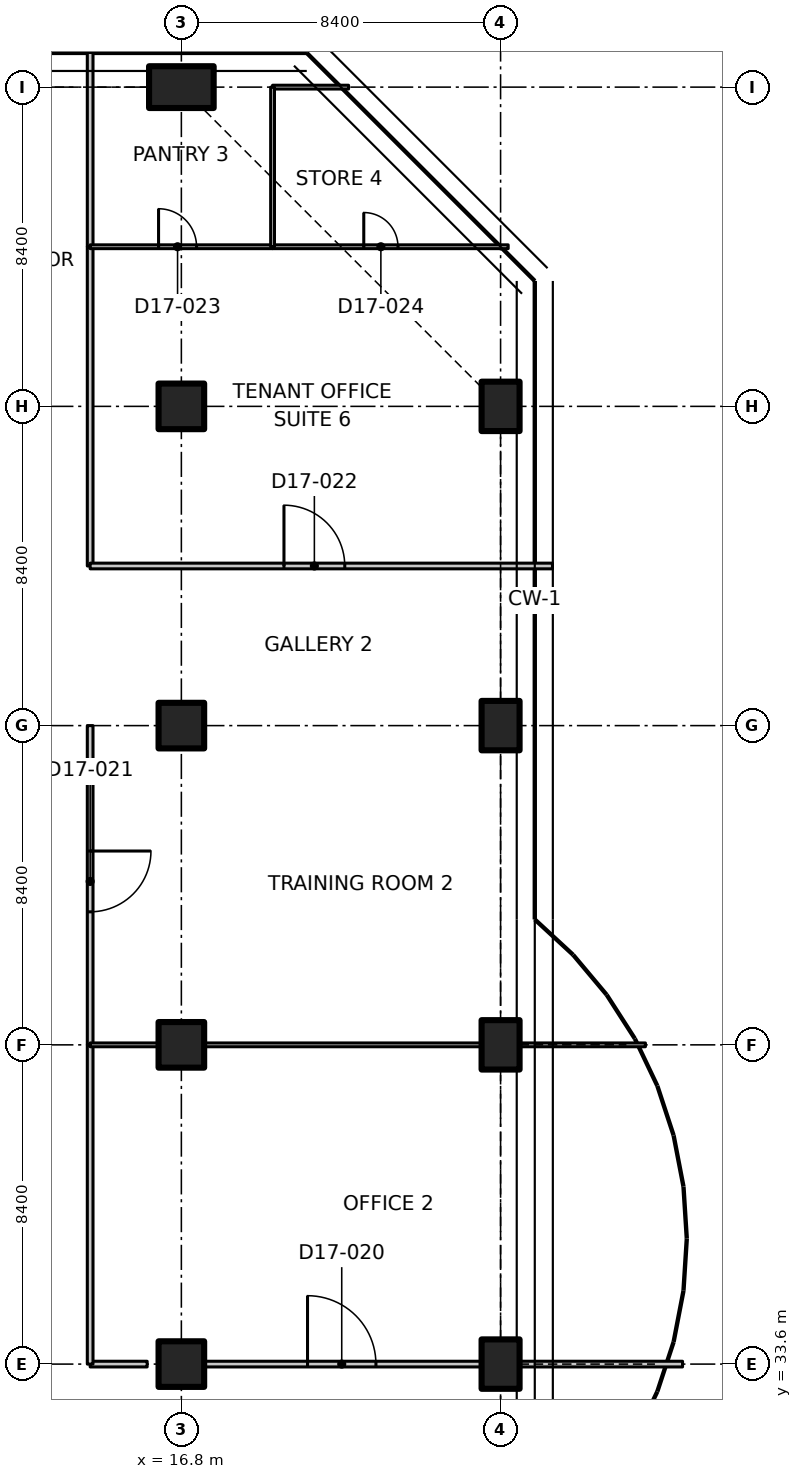
"""IFC4 building model, lengths in metres.
Left out: names, types, materials, properties, quantities, classifications, styles, units other than length and angle.
Written with IfcOpenShell. Run it as: python <this file> out.ifc"""

import sys

from ifc_helpers import new_model, si_unit, direction, frame, frame_2d, origin, origin_2d, place, context, subcontext, project, spatial, polyline, rectangle, outline, extrude, element, fill, save


model = new_model("IFC4")
c1 = context("Model", 3, precision=1e-05, world=origin(), true_north=direction((0.0, 1.0)))
c2 = subcontext(c1, "Body", "Model", "MODEL_VIEW")
j1 = project(units=[si_unit("LENGTHUNIT", "METRE"), si_unit("PLANEANGLEUNIT", "RADIAN")], contexts=[c1])
p1 = place(None, origin())
s1 = spatial("IfcSite", under=j1, at=p1, CompositionType="ELEMENT")
p2 = place(p1, origin())
s2 = spatial("IfcBuilding", under=s1, at=p2, CompositionType="ELEMENT")
p3 = place(p2, frame((0.0, 0.0, 134.9)))
s3 = spatial("IfcBuildingStorey", under=s2, at=p3, CompositionType="ELEMENT", Elevation=134.9)
for number, where, z_axis, x_axis in (
    (1, (16.8, 33.6, 0.0), (0.0, 0.0, 1.0), (1.0, 0.0, 0.0)),
    (2, (16.8, 42.0, 0.0), (0.0, 0.0, 1.0), (1.0, 0.0, 0.0)),
    (3, (16.8, 50.4, 0.0), (0.0, 0.0, 1.0), (1.0, 0.0, 0.0)),
    (4, (16.8, 58.8, 0.0), (0.0, 0.0, 1.0), (1.0, 0.0, 0.0)),
):
    element("IfcColumn", number, at=place(p3, frame(where, z_axis=z_axis, x_axis=x_axis)), inside=s3, PredefinedType="COLUMN", context=c2, shape_type="SweptSolid", body=[
        extrude(rectangle(XDim=1.2, YDim=1.2, at=origin_2d()), origin(), (0.0, 0.0, 1.0), 3.35),
    ])
p4 = place(p3, frame((16.8, 67.2, 0.0), z_axis=(0.0, 0.0, 1.0), x_axis=(0.0, 1.0, 0.0)))
e5 = element("IfcColumn", 5, at=p4, inside=s3, PredefinedType="COLUMN", context=c2, shape_type="SweptSolid", body=[
    extrude(rectangle(XDim=1.1, YDim=1.7, at=origin_2d()), origin(), (0.0, 0.0, 1.0), 3.35),
])
for number, where, z_axis, x_axis in (
    (6, (25.2, 33.6, 0.0), (0.0, 0.0, 1.0), (1.0, 0.0, 0.0)),
    (7, (25.2, 42.0, 0.0), (0.0, 0.0, 1.0), (1.0, 0.0, 0.0)),
    (8, (25.2, 50.4, 0.0), (0.0, 0.0, 1.0), (1.0, 0.0, 0.0)),
    (9, (25.2, 58.8, 0.0), (0.0, 0.0, 1.0), (1.0, 0.0, 0.0)),
):
    element("IfcColumn", number, at=place(p3, frame(where, z_axis=z_axis, x_axis=x_axis)), inside=s3, PredefinedType="COLUMN", context=c2, shape_type="SweptSolid", body=[
        extrude(rectangle(XDim=1.0, YDim=1.3, at=origin_2d()), origin(), (0.0, 0.0, 1.0), 3.35),
    ])
p5 = place(p3, frame((14.4, 33.6, 0.0), z_axis=(0.0, 0.0, 1.0), x_axis=(1.0, 0.0, 0.0)))
e10 = element("IfcWall", 10, at=p5, inside=s3, PredefinedType="PARTITIONING", context=c2, shape_type="SweptSolid", body=[
    extrude(rectangle(XDim=1.5, YDim=0.15, at=frame_2d((0.75, 0.0))), origin(), (0.0, 0.0, 1.0), 3.33),
])
p6 = place(p3, frame((17.42, 33.6, 0.0), z_axis=(0.0, 0.0, 1.0), x_axis=(1.0, 0.0, 0.0)))
e11 = element("IfcWall", 11, at=p6, inside=s3, PredefinedType="PARTITIONING", context=c2, shape_type="SweptSolid", body=[
    extrude(rectangle(XDim=7.26, YDim=0.15, at=frame_2d((3.63, 0.0))), origin(), (0.0, 0.0, 1.0), 3.33),
])
p7 = place(p6, frame((2.7, 0.0, 0.0)))
e12 = element("IfcOpeningElement", 12, at=p7, cuts=e11, PredefinedType="OPENING", context=c2, shape_type="SweptSolid", body=[
    extrude(rectangle(XDim=1.8, YDim=2.1, at=frame_2d((0.9, 1.05))), frame((0.0, 0.085, 0.0), z_axis=(0.0, -1.0, 0.0), x_axis=(1.0, 0.0, 0.0)), (0.0, 0.0, 1.0), 0.17),
])
p8 = place(p3, frame((25.72, 33.6, 0.0), z_axis=(0.0, 0.0, 1.0), x_axis=(1.0, 0.0, 0.0)))
e13 = element("IfcWall", 13, at=p8, inside=s3, PredefinedType="PARTITIONING", context=c2, shape_type="SweptSolid", body=[
    extrude(rectangle(XDim=4.268, YDim=0.15, at=frame_2d((2.134, 0.0))), origin(), (0.0, 0.0, 1.0), 2.98),
])
p9 = place(p3, frame((14.4, 42.0, 0.0), z_axis=(0.0, 0.0, 1.0), x_axis=(0.0, -1.0, 0.0)))
e14 = element("IfcWall", 14, at=p9, inside=s3, PredefinedType="PARTITIONING", context=c2, shape_type="SweptSolid", body=[
    extrude(rectangle(XDim=8.4, YDim=0.15, at=frame_2d((4.2, 0.0))), origin(), (0.0, 0.0, 1.0), 3.33),
])
p10 = place(p3, frame((14.4, 50.4, 0.0), z_axis=(0.0, 0.0, 1.0), x_axis=(0.0, -1.0, 0.0)))
e15 = element("IfcWall", 15, at=p10, inside=s3, PredefinedType="PARTITIONING", context=c2, shape_type="SweptSolid", body=[
    extrude(rectangle(XDim=8.4, YDim=0.15, at=frame_2d((4.2, 0.0))), origin(), (0.0, 0.0, 1.0), 3.33),
])
p11 = place(p10, frame((3.3, 0.0, 0.0)))
e16 = element("IfcOpeningElement", 16, at=p11, cuts=e15, PredefinedType="OPENING", context=c2, shape_type="SweptSolid", body=[
    extrude(rectangle(XDim=1.6, YDim=2.1, at=frame_2d((0.8, 1.05))), frame((0.0, 0.085, 0.0), z_axis=(0.0, -1.0, 0.0), x_axis=(1.0, 0.0, 0.0)), (0.0, 0.0, 1.0), 0.17),
])
p12 = place(p3, frame((14.4, 63.0, 0.0), z_axis=(0.0, 0.0, 1.0), x_axis=(0.0, -1.0, 0.0)))
e17 = element("IfcWall", 17, at=p12, inside=s3, PredefinedType="PARTITIONING", context=c2, shape_type="SweptSolid", body=[
    extrude(rectangle(XDim=8.4, YDim=0.15, at=frame_2d((4.2, 0.0))), origin(), (0.0, 0.0, 1.0), 3.33),
])
p13 = place(p3, frame((14.4, 68.28, 0.0), z_axis=(0.0, 0.0, 1.0), x_axis=(0.0, -1.0, 0.0)))
e18 = element("IfcWall", 18, at=p13, inside=s3, PredefinedType="PARTITIONING", context=c2, shape_type="SweptSolid", body=[
    extrude(outline(polyline([(0.0, 0.0), (5.28, 0.0), (5.28, 3.33), (1.53, 3.33), (1.528, 2.98), (0.632, 2.98), (0.63, 3.33), (0.0, 3.33), (0.0, 0.0)])), frame((0.0, 0.075, 0.0), z_axis=(0.0, -1.0, 0.0), x_axis=(1.0, 0.0, 0.0)), (0.0, 0.0, 1.0), 0.15),
])
p14 = place(p3, frame((14.4, 54.6, 0.0), z_axis=(0.0, 0.0, 1.0), x_axis=(1.0, 0.0, 0.0)))
e19 = element("IfcWall", 19, at=p14, inside=s3, PredefinedType="PARTITIONING", context=c2, shape_type="SweptSolid", body=[
    extrude(outline(polyline([(0.0, 0.0), (12.165, 0.0), (12.165, 3.33), (11.9, 3.33), (11.25, 3.33), (11.248, 2.98), (10.352, 2.98), (10.35, 3.33), (0.0, 3.33), (0.0, 0.0)])), frame((0.0, 0.075, 0.0), z_axis=(0.0, -1.0, 0.0), x_axis=(1.0, 0.0, 0.0)), (0.0, 0.0, 1.0), 0.15),
])
p15 = place(p14, frame((5.1, 0.0, 0.0)))
e20 = element("IfcOpeningElement", 20, at=p15, cuts=e19, PredefinedType="OPENING", context=c2, shape_type="SweptSolid", body=[
    extrude(rectangle(XDim=1.6, YDim=2.1, at=frame_2d((0.8, 1.05))), frame((0.0, 0.085, 0.0), z_axis=(0.0, -1.0, 0.0), x_axis=(1.0, 0.0, 0.0)), (0.0, 0.0, 1.0), 0.17),
])
p16 = place(p3, frame((14.4, 42.0, 0.0), z_axis=(0.0, 0.0, 1.0), x_axis=(1.0, 0.0, 0.0)))
e21 = element("IfcWall", 21, at=p16, inside=s3, PredefinedType="PARTITIONING", context=c2, shape_type="SweptSolid", body=[
    extrude(rectangle(XDim=1.78, YDim=0.1, at=frame_2d((0.89, 0.0))), origin(), (0.0, 0.0, 1.0), 3.33),
])
p17 = place(p3, frame((17.42, 42.0, 0.0), z_axis=(0.0, 0.0, 1.0), x_axis=(1.0, 0.0, 0.0)))
e22 = element("IfcWall", 22, at=p17, inside=s3, PredefinedType="PARTITIONING", context=c2, shape_type="SweptSolid", body=[
    extrude(rectangle(XDim=7.26, YDim=0.1, at=frame_2d((3.63, 0.0))), origin(), (0.0, 0.0, 1.0), 3.33),
])
p18 = place(p3, frame((25.72, 42.0, 0.0), z_axis=(0.0, 0.0, 1.0), x_axis=(1.0, 0.0, 0.0)))
e23 = element("IfcWall", 23, at=p18, inside=s3, PredefinedType="PARTITIONING", context=c2, shape_type="SweptSolid", body=[
    extrude(rectangle(XDim=3.292, YDim=0.1, at=frame_2d((1.646, 0.0))), origin(), (0.0, 0.0, 1.0), 2.98),
])
p19 = place(p3, frame((14.4, 63.0, 0.0), z_axis=(0.0, 0.0, 1.0), x_axis=(1.0, 0.0, 0.0)))
e24 = element("IfcWall", 24, at=p19, inside=s3, PredefinedType="PARTITIONING", context=c2, shape_type="SweptSolid", body=[
    extrude(rectangle(XDim=4.8, YDim=0.1, at=frame_2d((2.4, 0.0))), origin(), (0.0, 0.0, 1.0), 3.33),
])
p20 = place(p19, frame((1.8, 0.0, 0.0)))
e25 = element("IfcOpeningElement", 25, at=p20, cuts=e24, PredefinedType="OPENING", context=c2, shape_type="SweptSolid", body=[
    extrude(rectangle(XDim=1.0, YDim=2.1, at=frame_2d((0.5, 1.05))), frame((0.0, 0.06, 0.0), z_axis=(0.0, -1.0, 0.0), x_axis=(1.0, 0.0, 0.0)), (0.0, 0.0, 1.0), 0.12),
])
p21 = place(p3, frame((19.2, 63.0, 0.0), z_axis=(0.0, 0.0, 1.0), x_axis=(1.0, 0.0, 0.0)))
e26 = element("IfcWall", 26, at=p21, inside=s3, PredefinedType="PARTITIONING", context=c2, shape_type="SweptSolid", body=[
    extrude(outline(polyline([(0.0, 0.0), (6.2, 0.0), (6.2, 3.33), (2.466, 3.33), (2.464, 2.98), (1.136, 2.98), (1.134, 3.33), (0.0, 3.33), (0.0, 0.0)])), frame((0.0, 0.05, 0.0), z_axis=(0.0, -1.0, 0.0), x_axis=(1.0, 0.0, 0.0)), (0.0, 0.0, 1.0), 0.1),
])
p22 = place(p21, frame((2.4, 0.0, 0.0)))
e27 = element("IfcOpeningElement", 27, at=p22, cuts=e26, PredefinedType="OPENING", context=c2, shape_type="SweptSolid", body=[
    extrude(rectangle(XDim=0.9, YDim=2.1, at=frame_2d((0.45, 1.05))), frame((0.0, 0.06, 0.0), z_axis=(0.0, -1.0, 0.0), x_axis=(1.0, 0.0, 0.0)), (0.0, 0.0, 1.0), 0.12),
])
p23 = place(p3, frame((21.2, 67.2, 0.0), z_axis=(0.0, 0.0, 1.0), x_axis=(-1.0, 0.0, 0.0)))
e28 = element("IfcWall", 28, at=p23, inside=s3, PredefinedType="PARTITIONING", context=c2, shape_type="SweptSolid", body=[
    extrude(rectangle(XDim=2.0, YDim=0.1, at=frame_2d((1.0, 0.0))), origin(), (0.0, 0.0, 1.0), 3.33),
])
p24 = place(p3, frame((19.2, 67.2, 0.0), z_axis=(0.0, 0.0, 1.0), x_axis=(0.0, -1.0, 0.0)))
e29 = element("IfcWall", 29, at=p24, inside=s3, PredefinedType="PARTITIONING", context=c2, shape_type="SweptSolid", body=[
    extrude(rectangle(XDim=4.2, YDim=0.1, at=frame_2d((2.1, 0.0))), origin(), (0.0, 0.0, 1.0), 2.98),
])
p25 = place(p7, origin())
e30 = element("IfcDoor", 30, at=p25, inside=s3, OperationType="DOUBLE_DOOR_SINGLE_SWING", PredefinedType="DOOR", context=c2, shape_type="SweptSolid", body=[
    extrude(rectangle(XDim=1.8, YDim=2.1, at=frame_2d((0.9, 1.05))), frame((0.0, 0.025, 0.0), z_axis=(0.0, -1.0, 0.0), x_axis=(1.0, 0.0, 0.0)), (0.0, 0.0, 1.0), 0.05),
])
fill(e12, e30)
p26 = place(p11, origin())
e31 = element("IfcDoor", 31, at=p26, inside=s3, OperationType="DOUBLE_DOOR_SINGLE_SWING", PredefinedType="DOOR", context=c2, shape_type="SweptSolid", body=[
    extrude(rectangle(XDim=1.6, YDim=2.1, at=frame_2d((0.8, 1.05))), frame((0.0, 0.025, 0.0), z_axis=(0.0, -1.0, 0.0), x_axis=(1.0, 0.0, 0.0)), (0.0, 0.0, 1.0), 0.05),
])
fill(e16, e31)
p27 = place(p15, origin())
e32 = element("IfcDoor", 32, at=p27, inside=s3, OperationType="DOUBLE_DOOR_SINGLE_SWING", PredefinedType="DOOR", context=c2, shape_type="SweptSolid", body=[
    extrude(rectangle(XDim=1.6, YDim=2.1, at=frame_2d((0.8, 1.05))), frame((0.0, 0.025, 0.0), z_axis=(0.0, -1.0, 0.0), x_axis=(1.0, 0.0, 0.0)), (0.0, 0.0, 1.0), 0.05),
])
fill(e20, e32)
p28 = place(p20, origin())
e33 = element("IfcDoor", 33, at=p28, inside=s3, OperationType="SINGLE_SWING_LEFT", PredefinedType="DOOR", context=c2, shape_type="SweptSolid", body=[
    extrude(rectangle(XDim=1.0, YDim=2.1, at=frame_2d((0.5, 1.05))), frame((0.0, 0.025, 0.0), z_axis=(0.0, -1.0, 0.0), x_axis=(1.0, 0.0, 0.0)), (0.0, 0.0, 1.0), 0.05),
])
fill(e25, e33)
p29 = place(p22, origin())
e34 = element("IfcDoor", 34, at=p29, inside=s3, OperationType="SINGLE_SWING_LEFT", PredefinedType="DOOR", context=c2, shape_type="SweptSolid", body=[
    extrude(rectangle(XDim=0.9, YDim=2.1, at=frame_2d((0.45, 1.05))), frame((0.0, 0.025, 0.0), z_axis=(0.0, -1.0, 0.0), x_axis=(1.0, 0.0, 0.0)), (0.0, 0.0, 1.0), 0.05),
])
fill(e27, e34)
save(model, sys.argv[1])
